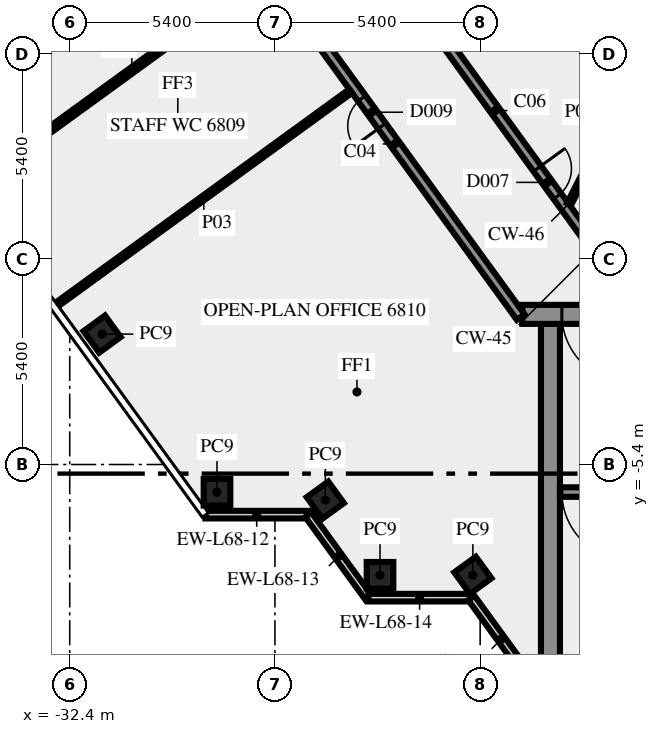
"""IFC4 building model, lengths in metres.
Left out: names, types, materials, properties, quantities, classifications, styles, units other than length and angle.
Written with IfcOpenShell. Run it as: python <this file> out.ifc"""

import sys

from ifc_helpers import new_model, si_unit, direction, frame, frame_2d, origin, origin_2d, place, context, subcontext, project, spatial, rectangle, extrude, element, fill, save


model = new_model("IFC4")
c1 = context("Model", 3, precision=1e-05, world=origin(), true_north=direction((0.0, 1.0)))
c2 = subcontext(c1, "Body", "Model", "MODEL_VIEW")
j1 = project(units=[si_unit("LENGTHUNIT", "METRE"), si_unit("PLANEANGLEUNIT", "RADIAN")], contexts=[c1])
p1 = place(None, origin())
s1 = spatial("IfcSite", under=j1, at=p1, CompositionType="ELEMENT")
p2 = place(p1, origin())
s2 = spatial("IfcBuilding", under=s1, at=p2, CompositionType="ELEMENT")
p3 = place(p2, frame((0.0, 0.0, 293.0)))
s3 = spatial("IfcBuildingStorey", under=s2, at=p3, CompositionType="ELEMENT", Elevation=293.0)
for number, where, z_axis, x_axis in (
    (1, (-31.548, -1.969, 0.0), (0.0, 0.0, 1.0), (0.588, -0.809, 0.0)),
    (2, (-28.525, -6.13, 0.0), (0.0, 0.0, 1.0), (1.0, 0.0, 0.0)),
    (3, (-25.674, -6.337, 0.0), (0.0, 0.0, 1.0), (0.588, -0.809, 0.0)),
    (4, (-24.235, -8.315, 0.0), (0.0, 0.0, 1.0), (1.0, 0.0, 0.0)),
    (5, (-21.792, -8.315, 0.0), (0.0, 0.0, 1.0), (0.588, -0.809, 0.0)),
):
    element("IfcColumn", number, at=place(p3, frame(where, z_axis=z_axis, x_axis=x_axis)), inside=s3, PredefinedType="COLUMN", context=c2, shape_type="SweptSolid", body=[
        extrude(rectangle(XDim=0.7, YDim=0.7, at=origin_2d()), origin(), (0.0, 0.0, 1.0), 3.65),
    ])
p4 = place(p3, frame((-28.83, -6.719, 0.0), z_axis=(0.0, 0.0, 1.0), x_axis=(1.0, 0.0, 0.0)))
e6 = element("IfcWall", 6, at=p4, inside=s3, PredefinedType="SOLIDWALL", context=c2, shape_type="SweptSolid", body=[
    extrude(rectangle(XDim=2.7, YDim=0.2, at=frame_2d((1.35, 0.0))), origin(), (0.0, 0.0, 1.0), 3.65),
])
p5 = place(p3, frame((-26.12, -6.724, 0.0), z_axis=(0.0, 0.0, 1.0), x_axis=(0.587720002413, -0.809064397168, 0.0)))
e7 = element("IfcWall", 7, at=p5, inside=s3, PredefinedType="SOLIDWALL", context=c2, shape_type="SweptSolid", body=[
    extrude(rectangle(XDim=2.7, YDim=0.2, at=frame_2d((1.35, 0.0))), origin(), (0.0, 0.0, 1.0), 3.65),
])
p6 = place(p3, frame((-24.543, -8.904, 0.0), z_axis=(0.0, 0.0, 1.0), x_axis=(1.0, 0.0, 0.0)))
e8 = element("IfcWall", 8, at=p6, inside=s3, PredefinedType="SOLIDWALL", context=c2, shape_type="SweptSolid", body=[
    extrude(rectangle(XDim=2.7, YDim=0.2, at=frame_2d((1.35, 0.0))), origin(), (0.0, 0.0, 1.0), 3.65),
])
p7 = place(p3, frame((-21.833, -8.909, 0.0), z_axis=(0.0, 0.0, 1.0), x_axis=(0.587766567315, -0.809030569476, 0.0)))
e9 = element("IfcWall", 9, at=p7, inside=s3, PredefinedType="SOLIDWALL", context=c2, shape_type="SweptSolid", body=[
    extrude(rectangle(XDim=2.688, YDim=0.2, at=frame_2d((1.344, 0.0))), origin(), (0.0, 0.0, 1.0), 3.65),
])
p8 = place(p3, frame((-19.75, -10.5, 0.0), z_axis=(0.0, 0.0, 1.0), x_axis=(0.0, 1.0, 0.0)))
e10 = element("IfcWall", 10, at=p8, inside=s3, PredefinedType="SHEAR", context=c2, shape_type="SweptSolid", body=[
    extrude(rectangle(XDim=8.8, YDim=0.5, at=frame_2d((4.4, 0.0))), origin(), (0.0, 0.0, 1.0), 3.65),
])
p9 = place(p3, frame((-11.45, -6.125, 0.0), z_axis=(0.0, 0.0, 1.0), x_axis=(-1.0, 0.0, 0.0)))
e11 = element("IfcWall", 11, at=p9, inside=s3, PredefinedType="SHEAR", context=c2, shape_type="SweptSolid", body=[
    extrude(rectangle(XDim=8.05, YDim=0.25, at=frame_2d((4.025, 0.0))), origin(), (0.0, 0.0, 1.0), 3.65),
])
p10 = place(p9, frame((6.2, 0.0, 0.0)))
e12 = element("IfcOpeningElement", 12, at=p10, cuts=e11, PredefinedType="OPENING", context=c2, shape_type="SweptSolid", body=[
    extrude(rectangle(XDim=1.8, YDim=2.1, at=frame_2d((0.9, 1.05))), frame((0.0, 0.135, 0.0), z_axis=(0.0, -1.0, 0.0), x_axis=(1.0, 0.0, 0.0)), (0.0, 0.0, 1.0), 0.27),
])
p11 = place(p3, frame((20.49, -1.45, 0.0), z_axis=(0.0, 0.0, 1.0), x_axis=(-1.0, 0.0, 0.0)))
e13 = element("IfcWall", 13, at=p11, inside=s3, PredefinedType="SHEAR", context=c2, shape_type="SweptSolid", body=[
    extrude(rectangle(XDim=40.98, YDim=0.5, at=frame_2d((20.49, 0.0))), origin(), (0.0, 0.0, 1.0), 3.65),
])
p12 = place(p11, frame((38.14, 0.0, 0.0)))
e14 = element("IfcOpeningElement", 14, at=p12, cuts=e13, PredefinedType="OPENING", context=c2, shape_type="SweptSolid", body=[
    extrude(rectangle(XDim=1.8, YDim=2.1, at=frame_2d((0.9, 1.05))), frame((0.0, 0.26, 0.0), z_axis=(0.0, -1.0, 0.0), x_axis=(1.0, 0.0, 0.0)), (0.0, 0.0, 1.0), 0.52),
])
p13 = place(p11, frame((35.89, 0.0, 0.0)))
e15 = element("IfcOpeningElement", 15, at=p13, cuts=e13, PredefinedType="OPENING", context=c2, shape_type="SweptSolid", body=[
    extrude(rectangle(XDim=0.9, YDim=2.1, at=frame_2d((0.45, 1.05))), frame((0.0, 0.26, 0.0), z_axis=(0.0, -1.0, 0.0), x_axis=(1.0, 0.0, 0.0)), (0.0, 0.0, 1.0), 0.52),
])
p14 = place(p11, frame((32.94, 0.0, 0.0)))
e16 = element("IfcOpeningElement", 16, at=p14, cuts=e13, PredefinedType="OPENING", context=c2, shape_type="SweptSolid", body=[
    extrude(rectangle(XDim=0.9, YDim=2.1, at=frame_2d((0.45, 1.05))), frame((0.0, 0.26, 0.0), z_axis=(0.0, -1.0, 0.0), x_axis=(1.0, 0.0, 0.0)), (0.0, 0.0, 1.0), 0.52),
])
p15 = place(p11, frame((31.015, 0.0, 0.0)))
e17 = element("IfcOpeningElement", 17, at=p15, cuts=e13, PredefinedType="OPENING", context=c2, shape_type="SweptSolid", body=[
    extrude(rectangle(XDim=0.8, YDim=2.1, at=frame_2d((0.4, 1.05))), frame((0.0, 0.26, 0.0), z_axis=(0.0, -1.0, 0.0), x_axis=(1.0, 0.0, 0.0)), (0.0, 0.0, 1.0), 0.52),
])
p16 = place(p11, frame((24.765, 0.0, 0.0)))
e18 = element("IfcOpeningElement", 18, at=p16, cuts=e13, PredefinedType="OPENING", context=c2, shape_type="SweptSolid", body=[
    extrude(rectangle(XDim=0.8, YDim=2.1, at=frame_2d((0.4, 1.05))), frame((0.0, 0.26, 0.0), z_axis=(0.0, -1.0, 0.0), x_axis=(1.0, 0.0, 0.0)), (0.0, 0.0, 1.0), 0.52),
])
p17 = place(p11, frame((21.765, 0.0, 0.0)))
e19 = element("IfcOpeningElement", 19, at=p17, cuts=e13, PredefinedType="OPENING", context=c2, shape_type="SweptSolid", body=[
    extrude(rectangle(XDim=2.0, YDim=2.1, at=frame_2d((1.0, 1.05))), frame((0.0, 0.26, 0.0), z_axis=(0.0, -1.0, 0.0), x_axis=(1.0, 0.0, 0.0)), (0.0, 0.0, 1.0), 0.52),
])
p18 = place(p11, frame((15.202, 0.0, 0.0)))
e20 = element("IfcOpeningElement", 20, at=p18, cuts=e13, PredefinedType="OPENING", context=c2, shape_type="SweptSolid", body=[
    extrude(rectangle(XDim=0.9, YDim=2.1, at=frame_2d((0.45, 1.05))), frame((0.0, 0.26, 0.0), z_axis=(0.0, -1.0, 0.0), x_axis=(1.0, 0.0, 0.0)), (0.0, 0.0, 1.0), 0.52),
])
p19 = place(p11, frame((13.54, 0.0, 0.0)))
e21 = element("IfcOpeningElement", 21, at=p19, cuts=e13, PredefinedType="OPENING", context=c2, shape_type="SweptSolid", body=[
    extrude(rectangle(XDim=0.9, YDim=2.1, at=frame_2d((0.45, 1.05))), frame((0.0, 0.26, 0.0), z_axis=(0.0, -1.0, 0.0), x_axis=(1.0, 0.0, 0.0)), (0.0, 0.0, 1.0), 0.52),
])
p20 = place(p11, frame((11.64, 0.0, 0.0)))
e22 = element("IfcOpeningElement", 22, at=p20, cuts=e13, PredefinedType="OPENING", context=c2, shape_type="SweptSolid", body=[
    extrude(rectangle(XDim=0.9, YDim=2.1, at=frame_2d((0.45, 1.05))), frame((0.0, 0.26, 0.0), z_axis=(0.0, -1.0, 0.0), x_axis=(1.0, 0.0, 0.0)), (0.0, 0.0, 1.0), 0.52),
])
p21 = place(p11, frame((9.577, 0.0, 0.0)))
e23 = element("IfcOpeningElement", 23, at=p21, cuts=e13, PredefinedType="OPENING", context=c2, shape_type="SweptSolid", body=[
    extrude(rectangle(XDim=0.9, YDim=2.1, at=frame_2d((0.45, 1.05))), frame((0.0, 0.26, 0.0), z_axis=(0.0, -1.0, 0.0), x_axis=(1.0, 0.0, 0.0)), (0.0, 0.0, 1.0), 0.52),
])
p22 = place(p11, frame((7.14, 0.0, 0.0)))
e24 = element("IfcOpeningElement", 24, at=p22, cuts=e13, PredefinedType="OPENING", context=c2, shape_type="SweptSolid", body=[
    extrude(rectangle(XDim=0.9, YDim=2.1, at=frame_2d((0.45, 1.05))), frame((0.0, 0.26, 0.0), z_axis=(0.0, -1.0, 0.0), x_axis=(1.0, 0.0, 0.0)), (0.0, 0.0, 1.0), 0.52),
])
p23 = place(p11, frame((5.028, 0.0, 0.0)))
e25 = element("IfcOpeningElement", 25, at=p23, cuts=e13, PredefinedType="OPENING", context=c2, shape_type="SweptSolid", body=[
    extrude(rectangle(XDim=0.8, YDim=2.1, at=frame_2d((0.4, 1.05))), frame((0.0, 0.26, 0.0), z_axis=(0.0, -1.0, 0.0), x_axis=(1.0, 0.0, 0.0)), (0.0, 0.0, 1.0), 0.52),
])
p24 = place(p11, frame((3.452, 0.0, 0.0)))
e26 = element("IfcOpeningElement", 26, at=p24, cuts=e13, PredefinedType="OPENING", context=c2, shape_type="SweptSolid", body=[
    extrude(rectangle(XDim=0.8, YDim=2.1, at=frame_2d((0.4, 1.05))), frame((0.0, 0.26, 0.0), z_axis=(0.0, -1.0, 0.0), x_axis=(1.0, 0.0, 0.0)), (0.0, 0.0, 1.0), 0.52),
])
p25 = place(p11, frame((1.04, 0.0, 0.0)))
e27 = element("IfcOpeningElement", 27, at=p25, cuts=e13, PredefinedType="OPENING", context=c2, shape_type="SweptSolid", body=[
    extrude(rectangle(XDim=1.8, YDim=2.1, at=frame_2d((0.9, 1.05))), frame((0.0, 0.26, 0.0), z_axis=(0.0, -1.0, 0.0), x_axis=(1.0, 0.0, 0.0)), (0.0, 0.0, 1.0), 0.52),
])
p26 = place(p3, frame((-20.531, -1.523, 0.0), z_axis=(0.0, 0.0, 1.0), x_axis=(-0.587782646447, 0.809018887626, 0.0)))
e28 = element("IfcWall", 28, at=p26, inside=s3, PredefinedType="SOLIDWALL", context=c2, shape_type="SweptSolid", body=[
    extrude(rectangle(XDim=11.27, YDim=0.25, at=frame_2d((5.635, 0.0))), origin(), (0.0, 0.0, 1.0), 3.65),
])
p27 = place(p26, frame((6.216, 0.0, 0.0)))
e29 = element("IfcOpeningElement", 29, at=p27, cuts=e28, PredefinedType="OPENING", context=c2, shape_type="SweptSolid", body=[
    extrude(rectangle(XDim=0.9, YDim=2.1, at=frame_2d((0.45, 1.05))), frame((0.0, 0.135, 0.0), z_axis=(0.0, -1.0, 0.0), x_axis=(1.0, 0.0, 0.0)), (0.0, 0.0, 1.0), 0.27),
])
p28 = place(p26, frame((9.896, 0.0, 0.0)))
e30 = element("IfcOpeningElement", 30, at=p28, cuts=e28, PredefinedType="OPENING", context=c2, shape_type="SweptSolid", body=[
    extrude(rectangle(XDim=0.9, YDim=2.1, at=frame_2d((0.45, 1.05))), frame((0.0, 0.135, 0.0), z_axis=(0.0, -1.0, 0.0), x_axis=(1.0, 0.0, 0.0)), (0.0, 0.0, 1.0), 0.27),
])
p29 = place(p3, frame((-24.865, 8.95, 0.0), z_axis=(0.0, 0.0, 1.0), x_axis=(0.587791617212, -0.809012369952, 0.0)))
e31 = element("IfcWall", 31, at=p29, inside=s3, PredefinedType="SOLIDWALL", context=c2, shape_type="SweptSolid", body=[
    extrude(rectangle(XDim=12.453, YDim=0.25, at=frame_2d((6.227, 0.0))), origin(), (0.0, 0.0, 1.0), 3.65),
])
p30 = place(p29, frame((8.112, 0.0, 0.0)))
e32 = element("IfcOpeningElement", 32, at=p30, cuts=e31, PredefinedType="OPENING", context=c2, shape_type="SweptSolid", body=[
    extrude(rectangle(XDim=0.9, YDim=2.1, at=frame_2d((0.45, 1.05))), frame((0.0, 0.135, 0.0), z_axis=(0.0, -1.0, 0.0), x_axis=(1.0, 0.0, 0.0)), (0.0, 0.0, 1.0), 0.27),
])
p31 = place(p3, frame((-25.008, 4.427, 0.0), z_axis=(0.0, 0.0, 1.0), x_axis=(-0.808994684961, -0.587815957341, 0.0)))
e33 = element("IfcWall", 33, at=p31, inside=s3, PredefinedType="PARTITIONING", context=c2, shape_type="SweptSolid", body=[
    extrude(rectangle(XDim=9.55, YDim=0.12, at=frame_2d((4.775, 0.0))), origin(), (0.0, 0.0, 1.0), 2.95),
])
p32 = place(p3, frame((-34.291, 2.41, 0.0), z_axis=(0.0, 0.0, 1.0), x_axis=(0.809027940177, 0.587770186393, 0.0)))
e34 = element("IfcWall", 34, at=p32, inside=s3, PredefinedType="PARTITIONING", context=c2, shape_type="SweptSolid", body=[
    extrude(rectangle(XDim=8.715, YDim=0.15, at=frame_2d((4.357, 0.0))), origin(), (0.0, 0.0, 1.0), 3.65),
])
p33 = place(p3, frame((-19.261, 1.45, 0.0), z_axis=(0.0, 0.0, 1.0), x_axis=(0.453950796792, 0.891026752736, 0.0)))
e35 = element("IfcWall", 35, at=p33, inside=s3, PredefinedType="PARTITIONING", context=c2, shape_type="SweptSolid", body=[
    extrude(rectangle(XDim=2.778, YDim=0.12, at=frame_2d((1.389, 0.0))), origin(), (0.0, 0.0, 1.0), 3.65),
])
p34 = place(p10, origin())
e36 = element("IfcDoor", 36, at=p34, inside=s3, OperationType="DOUBLE_DOOR_SINGLE_SWING", PredefinedType="DOOR", context=c2, shape_type="SweptSolid", body=[
    extrude(rectangle(XDim=1.8, YDim=2.1, at=frame_2d((0.9, 1.05))), frame((0.0, 0.025, 0.0), z_axis=(0.0, -1.0, 0.0), x_axis=(1.0, 0.0, 0.0)), (0.0, 0.0, 1.0), 0.05),
])
fill(e12, e36)
p35 = place(p12, origin())
e37 = element("IfcDoor", 37, at=p35, inside=s3, OperationType="DOUBLE_DOOR_SINGLE_SWING", PredefinedType="DOOR", context=c2, shape_type="SweptSolid", body=[
    extrude(rectangle(XDim=1.8, YDim=2.1, at=frame_2d((0.9, 1.05))), frame((0.0, 0.025, 0.0), z_axis=(0.0, -1.0, 0.0), x_axis=(1.0, 0.0, 0.0)), (0.0, 0.0, 1.0), 0.05),
])
fill(e14, e37)
p36 = place(p30, origin())
e38 = element("IfcDoor", 38, at=p36, inside=s3, OperationType="SINGLE_SWING_RIGHT", PredefinedType="DOOR", context=c2, shape_type="SweptSolid", body=[
    extrude(rectangle(XDim=0.9, YDim=2.1, at=frame_2d((0.45, 1.05))), frame((0.0, 0.025, 0.0), z_axis=(0.0, -1.0, 0.0), x_axis=(1.0, 0.0, 0.0)), (0.0, 0.0, 1.0), 0.05),
])
fill(e32, e38)
p37 = place(p27, origin())
e39 = element("IfcDoor", 39, at=p37, inside=s3, OperationType="SINGLE_SWING_RIGHT", PredefinedType="DOOR", context=c2, shape_type="SweptSolid", body=[
    extrude(rectangle(XDim=0.9, YDim=2.1, at=frame_2d((0.45, 1.05))), frame((0.0, 0.025, 0.0), z_axis=(0.0, -1.0, 0.0), x_axis=(1.0, 0.0, 0.0)), (0.0, 0.0, 1.0), 0.05),
])
fill(e29, e39)
save(model, sys.argv[1])
